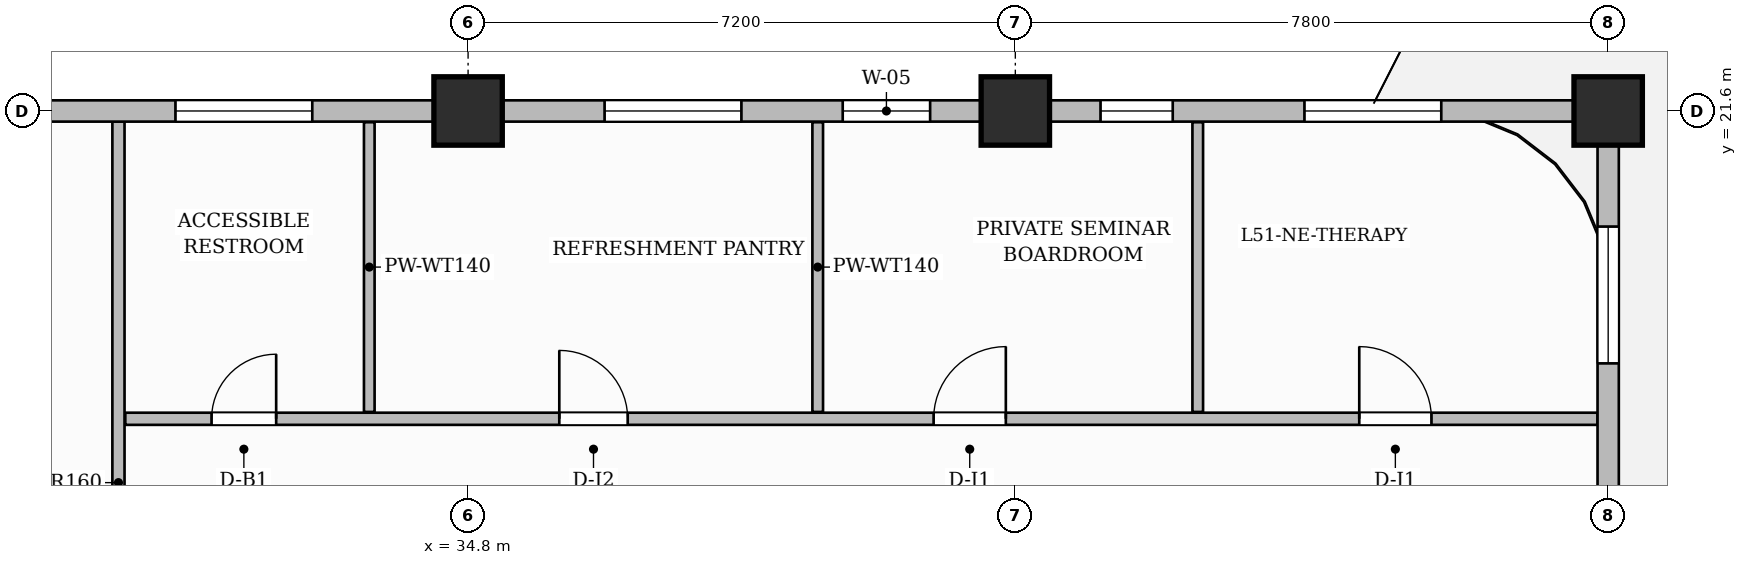
"""IFC4 building model, lengths in metres.
Left out: names, types, materials, properties, quantities, classifications, styles, units other than length and angle.
Written with IfcOpenShell. Run it as: python <this file> out.ifc"""

import sys

from ifc_helpers import new_model, si_unit, direction, frame, frame_2d, origin, origin_2d, place, context, subcontext, project, spatial, rectangle, extrude, source, transform, mapped, element, fill, save


model = new_model("IFC4")
c1 = context("Model", 3, precision=1e-05, world=origin(), true_north=direction((0.0, 1.0)))
c2 = subcontext(c1, "Body", "Model", "MODEL_VIEW")
j1 = project(units=[si_unit("LENGTHUNIT", "METRE"), si_unit("PLANEANGLEUNIT", "RADIAN")], contexts=[c1])
p1 = place(None, origin())
s1 = spatial("IfcSite", under=j1, at=p1, CompositionType="ELEMENT")
p2 = place(p1, origin())
s2 = spatial("IfcBuilding", under=s1, at=p2, CompositionType="ELEMENT")
p3 = place(p2, frame((0.0, 0.0, 205.75)))
s3 = spatial("IfcBuildingStorey", under=s2, at=p3, CompositionType="ELEMENT", Elevation=205.75)
m1 = source(origin(), c2, "Body", "SweptSolid", [
    extrude(rectangle(XDim=0.9, YDim=0.9, at=origin_2d()), origin(), (0.0, 0.0, 1.0), 3.85),
])
for number, where, z_axis, x_axis in (
    (1, (34.8, 21.6, 0.0), (0.0, 0.0, 1.0), (1.0, 0.0, 0.0)),
    (2, (42.0, 21.6, 0.0), (0.0, 0.0, 1.0), (1.0, 0.0, 0.0)),
    (3, (49.8, 21.6, 0.0), (0.0, 0.0, 1.0), (1.0, 0.0, 0.0)),
):
    element("IfcColumn", number, at=place(p3, frame(where, z_axis=z_axis, x_axis=x_axis)), inside=s3, PredefinedType="COLUMN", context=c2, shape_type="MappedRepresentation", body=[
        mapped(m1, transform((0.0, 0.0, 0.0), scale=1.0)),
    ])
p4 = place(p3, frame((30.2, 11.96, 0.0), z_axis=(0.0, 0.0, 1.0), x_axis=(0.0, 1.0, 0.0)))
e4 = element("IfcWall", 4, at=p4, inside=s3, PredefinedType="PARTITIONING", context=c2, shape_type="SweptSolid", body=[
    extrude(rectangle(XDim=9.5, YDim=0.16, at=frame_2d((4.75, 0.0))), origin(), (0.0, 0.0, 1.0), 3.6),
])
p5 = place(p3, frame((30.29, 17.55, 0.0), z_axis=(0.0, 0.0, 1.0), x_axis=(1.0, 0.0, 0.0)))
e5 = element("IfcWall", 5, at=p5, inside=s3, PredefinedType="PARTITIONING", context=c2, shape_type="SweptSolid", body=[
    extrude(rectangle(XDim=19.37, YDim=0.16, at=frame_2d((9.685, 0.0))), origin(), (0.0, 0.0, 1.0), 3.6),
])
p6 = place(p5, frame((1.135, 0.0, 0.0)))
e6 = element("IfcOpeningElement", 6, at=p6, cuts=e5, PredefinedType="OPENING", context=c2, shape_type="SweptSolid", body=[
    extrude(rectangle(XDim=0.85, YDim=2.1, at=frame_2d((0.425, 1.05))), frame((0.0, 0.09, 0.0), z_axis=(0.0, -1.0, 0.0), x_axis=(1.0, 0.0, 0.0)), (0.0, 0.0, 1.0), 0.18),
])
p7 = place(p5, frame((5.71, 0.0, 0.0)))
e7 = element("IfcOpeningElement", 7, at=p7, cuts=e5, PredefinedType="OPENING", context=c2, shape_type="SweptSolid", body=[
    extrude(rectangle(XDim=0.9, YDim=2.15, at=frame_2d((0.45, 1.075))), frame((0.0, 0.09, 0.0), z_axis=(0.0, -1.0, 0.0), x_axis=(1.0, 0.0, 0.0)), (0.0, 0.0, 1.0), 0.18),
])
p8 = place(p5, frame((10.635, 0.0, 0.0)))
e8 = element("IfcOpeningElement", 8, at=p8, cuts=e5, PredefinedType="OPENING", context=c2, shape_type="SweptSolid", body=[
    extrude(rectangle(XDim=0.95, YDim=2.15, at=frame_2d((0.475, 1.075))), frame((0.0, 0.09, 0.0), z_axis=(0.0, -1.0, 0.0), x_axis=(1.0, 0.0, 0.0)), (0.0, 0.0, 1.0), 0.18),
])
p9 = place(p5, frame((16.235, 0.0, 0.0)))
e9 = element("IfcOpeningElement", 9, at=p9, cuts=e5, PredefinedType="OPENING", context=c2, shape_type="SweptSolid", body=[
    extrude(rectangle(XDim=0.95, YDim=2.15, at=frame_2d((0.475, 1.075))), frame((0.0, 0.09, 0.0), z_axis=(0.0, -1.0, 0.0), x_axis=(1.0, 0.0, 0.0)), (0.0, 0.0, 1.0), 0.18),
])
for number, where, z_axis, x_axis in (
    (10, (33.5, 17.64, 0.0), (0.0, 0.0, 1.0), (0.0, 1.0, 0.0)),
    (11, (39.4, 17.64, 0.0), (0.0, 0.0, 1.0), (0.0, 1.0, 0.0)),
    (12, (44.4, 17.64, 0.0), (0.0, 0.0, 1.0), (0.0, 1.0, 0.0)),
):
    element("IfcWall", number, at=place(p3, frame(where, z_axis=z_axis, x_axis=x_axis)), inside=s3, PredefinedType="PARTITIONING", context=c2, shape_type="SweptSolid", body=[
        extrude(rectangle(XDim=3.812, YDim=0.14, at=frame_2d((1.906, 0.0))), origin(), (0.0, 0.0, 1.0), 3.6),
    ])
p10 = place(p3, frame((49.8, 14.62, 0.0), z_axis=(0.0, 0.0, 1.0), x_axis=(0.0, 1.0, 0.0)))
e13 = element("IfcWall", 13, at=p10, inside=s3, PredefinedType="SOLIDWALL", context=c2, shape_type="SweptSolid", body=[
    extrude(rectangle(XDim=6.93, YDim=0.28, at=frame_2d((3.465, 0.0))), origin(), (0.0, 0.0, 1.0), 3.085),
])
p11 = place(p10, frame((0.42, 0.0, 0.0)))
e14 = element("IfcOpeningElement", 14, at=p11, cuts=e13, PredefinedType="OPENING", context=c2, shape_type="SweptSolid", body=[
    extrude(rectangle(XDim=1.2, YDim=2.2, at=frame_2d((0.6, 1.1))), frame((0.0, 0.15, 0.0), z_axis=(0.0, -1.0, 0.0), x_axis=(1.0, 0.0, 0.0)), (0.0, 0.0, 1.0), 0.3),
])
p12 = place(p10, frame((3.659, 0.0, 0.8)))
e15 = element("IfcOpeningElement", 15, at=p12, cuts=e13, PredefinedType="OPENING", context=c2, shape_type="SweptSolid", body=[
    extrude(rectangle(XDim=1.8, YDim=1.85, at=frame_2d((0.9, 0.925))), frame((0.0, 0.15, 0.0), z_axis=(0.0, -1.0, 0.0), x_axis=(1.0, 0.0, 0.0)), (0.0, 0.0, 1.0), 0.3),
])
p13 = place(p3, frame((18.0, 21.6, 0.0), z_axis=(0.0, 0.0, 1.0), x_axis=(1.0, 0.0, 0.0)))
e16 = element("IfcWall", 16, at=p13, inside=s3, PredefinedType="SOLIDWALL", context=c2, shape_type="SweptSolid", body=[
    extrude(rectangle(XDim=31.8, YDim=0.28, at=frame_2d((15.9, 0.0))), origin(), (0.0, 0.0, 1.0), 3.085),
])
p14 = place(p13, frame((0.885, 0.0, 0.8)))
e17 = element("IfcOpeningElement", 17, at=p14, cuts=e16, PredefinedType="OPENING", context=c2, shape_type="SweptSolid", body=[
    extrude(rectangle(XDim=1.4, YDim=1.85, at=frame_2d((0.7, 0.925))), frame((0.0, 0.15, 0.0), z_axis=(0.0, -1.0, 0.0), x_axis=(1.0, 0.0, 0.0)), (0.0, 0.0, 1.0), 0.3),
])
p15 = place(p13, frame((4.581, 0.0, 0.8)))
e18 = element("IfcOpeningElement", 18, at=p15, cuts=e16, PredefinedType="OPENING", context=c2, shape_type="SweptSolid", body=[
    extrude(rectangle(XDim=0.95, YDim=1.75, at=frame_2d((0.475, 0.875))), frame((0.0, 0.15, 0.0), z_axis=(0.0, -1.0, 0.0), x_axis=(1.0, 0.0, 0.0)), (0.0, 0.0, 1.0), 0.3),
])
p16 = place(p13, frame((6.21, 0.0, 0.8)))
e19 = element("IfcOpeningElement", 19, at=p16, cuts=e16, PredefinedType="OPENING", context=c2, shape_type="SweptSolid", body=[
    extrude(rectangle(XDim=1.4, YDim=1.85, at=frame_2d((0.7, 0.925))), frame((0.0, 0.15, 0.0), z_axis=(0.0, -1.0, 0.0), x_axis=(1.0, 0.0, 0.0)), (0.0, 0.0, 1.0), 0.3),
])
p17 = place(p13, frame((8.48, 0.0, 0.8)))
e20 = element("IfcOpeningElement", 20, at=p17, cuts=e16, PredefinedType="OPENING", context=c2, shape_type="SweptSolid", body=[
    extrude(rectangle(XDim=1.15, YDim=1.8, at=frame_2d((0.575, 0.9))), frame((0.0, 0.15, 0.0), z_axis=(0.0, -1.0, 0.0), x_axis=(1.0, 0.0, 0.0)), (0.0, 0.0, 1.0), 0.3),
])
p18 = place(p13, frame((12.95, 0.0, 0.8)))
e21 = element("IfcOpeningElement", 21, at=p18, cuts=e16, PredefinedType="OPENING", context=c2, shape_type="SweptSolid", body=[
    extrude(rectangle(XDim=1.8, YDim=1.85, at=frame_2d((0.9, 0.925))), frame((0.0, 0.15, 0.0), z_axis=(0.0, -1.0, 0.0), x_axis=(1.0, 0.0, 0.0)), (0.0, 0.0, 1.0), 0.3),
])
p19 = place(p13, frame((18.596, 0.0, 0.8)))
e22 = element("IfcOpeningElement", 22, at=p19, cuts=e16, PredefinedType="OPENING", context=c2, shape_type="SweptSolid", body=[
    extrude(rectangle(XDim=1.8, YDim=1.85, at=frame_2d((0.9, 0.925))), frame((0.0, 0.15, 0.0), z_axis=(0.0, -1.0, 0.0), x_axis=(1.0, 0.0, 0.0)), (0.0, 0.0, 1.0), 0.3),
])
p20 = place(p13, frame((21.729, 0.0, 0.8)))
e23 = element("IfcOpeningElement", 23, at=p20, cuts=e16, PredefinedType="OPENING", context=c2, shape_type="SweptSolid", body=[
    extrude(rectangle(XDim=1.15, YDim=1.8, at=frame_2d((0.575, 0.9))), frame((0.0, 0.15, 0.0), z_axis=(0.0, -1.0, 0.0), x_axis=(1.0, 0.0, 0.0)), (0.0, 0.0, 1.0), 0.3),
])
p21 = place(p13, frame((25.121, 0.0, 0.8)))
e24 = element("IfcOpeningElement", 24, at=p21, cuts=e16, PredefinedType="OPENING", context=c2, shape_type="SweptSolid", body=[
    extrude(rectangle(XDim=0.95, YDim=1.75, at=frame_2d((0.475, 0.875))), frame((0.0, 0.15, 0.0), z_axis=(0.0, -1.0, 0.0), x_axis=(1.0, 0.0, 0.0)), (0.0, 0.0, 1.0), 0.3),
])
p22 = place(p13, frame((27.804, 0.0, 0.8)))
e25 = element("IfcOpeningElement", 25, at=p22, cuts=e16, PredefinedType="OPENING", context=c2, shape_type="SweptSolid", body=[
    extrude(rectangle(XDim=1.8, YDim=1.85, at=frame_2d((0.9, 0.925))), frame((0.0, 0.15, 0.0), z_axis=(0.0, -1.0, 0.0), x_axis=(1.0, 0.0, 0.0)), (0.0, 0.0, 1.0), 0.3),
])
m2 = source(origin(), c2, "Body", "SweptSolid", [
    extrude(rectangle(XDim=0.85, YDim=2.1, at=frame_2d((0.425, 1.05))), frame((0.0, 0.025, 0.0), z_axis=(0.0, -1.0, 0.0), x_axis=(1.0, 0.0, 0.0)), (0.0, 0.0, 1.0), 0.05),
])
p23 = place(p6, origin())
e26 = element("IfcDoor", 26, at=p23, inside=s3, OperationType="SINGLE_SWING_RIGHT", PredefinedType="DOOR", context=c2, shape_type="MappedRepresentation", body=[
    mapped(m2, transform((0.0, 0.0, 0.0), scale=1.0)),
])
fill(e6, e26)
m3 = source(origin(), c2, "Body", "SweptSolid", [
    extrude(rectangle(XDim=0.9, YDim=2.15, at=frame_2d((0.45, 1.075))), frame((0.0, 0.025, 0.0), z_axis=(0.0, -1.0, 0.0), x_axis=(1.0, 0.0, 0.0)), (0.0, 0.0, 1.0), 0.05),
])
p24 = place(p7, origin())
e27 = element("IfcDoor", 27, at=p24, inside=s3, OperationType="SINGLE_SWING_LEFT", PredefinedType="DOOR", context=c2, shape_type="MappedRepresentation", body=[
    mapped(m3, transform((0.0, 0.0, 0.0), scale=1.0)),
])
fill(e7, e27)
m4 = source(origin(), c2, "Body", "SweptSolid", [
    extrude(rectangle(XDim=0.95, YDim=2.15, at=frame_2d((0.475, 1.075))), frame((0.0, 0.025, 0.0), z_axis=(0.0, -1.0, 0.0), x_axis=(1.0, 0.0, 0.0)), (0.0, 0.0, 1.0), 0.05),
])
p25 = place(p8, origin())
e28 = element("IfcDoor", 28, at=p25, inside=s3, OperationType="SINGLE_SWING_RIGHT", PredefinedType="DOOR", context=c2, shape_type="MappedRepresentation", body=[
    mapped(m4, transform((0.0, 0.0, 0.0), scale=1.0)),
])
fill(e8, e28)
p26 = place(p9, origin())
e29 = element("IfcDoor", 29, at=p26, inside=s3, OperationType="SINGLE_SWING_LEFT", PredefinedType="DOOR", context=c2, shape_type="MappedRepresentation", body=[
    mapped(m4, transform((0.0, 0.0, 0.0), scale=1.0)),
])
fill(e9, e29)
m5 = source(origin(), c2, "Body", "SweptSolid", [
    extrude(rectangle(XDim=1.8, YDim=1.85, at=frame_2d((0.9, 0.925))), frame((0.0, 0.03, 0.0), z_axis=(0.0, -1.0, 0.0), x_axis=(1.0, 0.0, 0.0)), (0.0, 0.0, 1.0), 0.06),
])
p27 = place(p12, origin())
e30 = element("IfcWindow", 30, at=p27, inside=s3, PartitioningType="DOUBLE_PANEL_VERTICAL", PredefinedType="WINDOW", context=c2, shape_type="MappedRepresentation", body=[
    mapped(m5, transform((0.0, 0.0, 0.0), scale=1.0)),
])
fill(e15, e30)
p28 = place(p18, origin())
e31 = element("IfcWindow", 31, at=p28, inside=s3, PartitioningType="DOUBLE_PANEL_VERTICAL", PredefinedType="WINDOW", context=c2, shape_type="MappedRepresentation", body=[
    mapped(m5, transform((0.0, 0.0, 0.0), scale=1.0)),
])
fill(e21, e31)
p29 = place(p19, origin())
e32 = element("IfcWindow", 32, at=p29, inside=s3, PartitioningType="DOUBLE_PANEL_VERTICAL", PredefinedType="WINDOW", context=c2, shape_type="MappedRepresentation", body=[
    mapped(m5, transform((0.0, 0.0, 0.0), scale=1.0)),
])
fill(e22, e32)
m6 = source(origin(), c2, "Body", "SweptSolid", [
    extrude(rectangle(XDim=1.15, YDim=1.8, at=frame_2d((0.575, 0.9))), frame((0.0, 0.03, 0.0), z_axis=(0.0, -1.0, 0.0), x_axis=(1.0, 0.0, 0.0)), (0.0, 0.0, 1.0), 0.06),
])
p30 = place(p20, origin())
e33 = element("IfcWindow", 33, at=p30, inside=s3, PartitioningType="SINGLE_PANEL", PredefinedType="WINDOW", context=c2, shape_type="MappedRepresentation", body=[
    mapped(m6, transform((0.0, 0.0, 0.0), scale=1.0)),
])
fill(e23, e33)
m7 = source(origin(), c2, "Body", "SweptSolid", [
    extrude(rectangle(XDim=0.95, YDim=1.75, at=frame_2d((0.475, 0.875))), frame((0.0, 0.03, 0.0), z_axis=(0.0, -1.0, 0.0), x_axis=(1.0, 0.0, 0.0)), (0.0, 0.0, 1.0), 0.06),
])
p31 = place(p21, origin())
e34 = element("IfcWindow", 34, at=p31, inside=s3, PartitioningType="SINGLE_PANEL", PredefinedType="WINDOW", context=c2, shape_type="MappedRepresentation", body=[
    mapped(m7, transform((0.0, 0.0, 0.0), scale=1.0)),
])
fill(e24, e34)
p32 = place(p22, origin())
e35 = element("IfcWindow", 35, at=p32, inside=s3, PartitioningType="DOUBLE_PANEL_VERTICAL", PredefinedType="WINDOW", context=c2, shape_type="MappedRepresentation", body=[
    mapped(m5, transform((0.0, 0.0, 0.0), scale=1.0)),
])
fill(e25, e35)
save(model, sys.argv[1])
